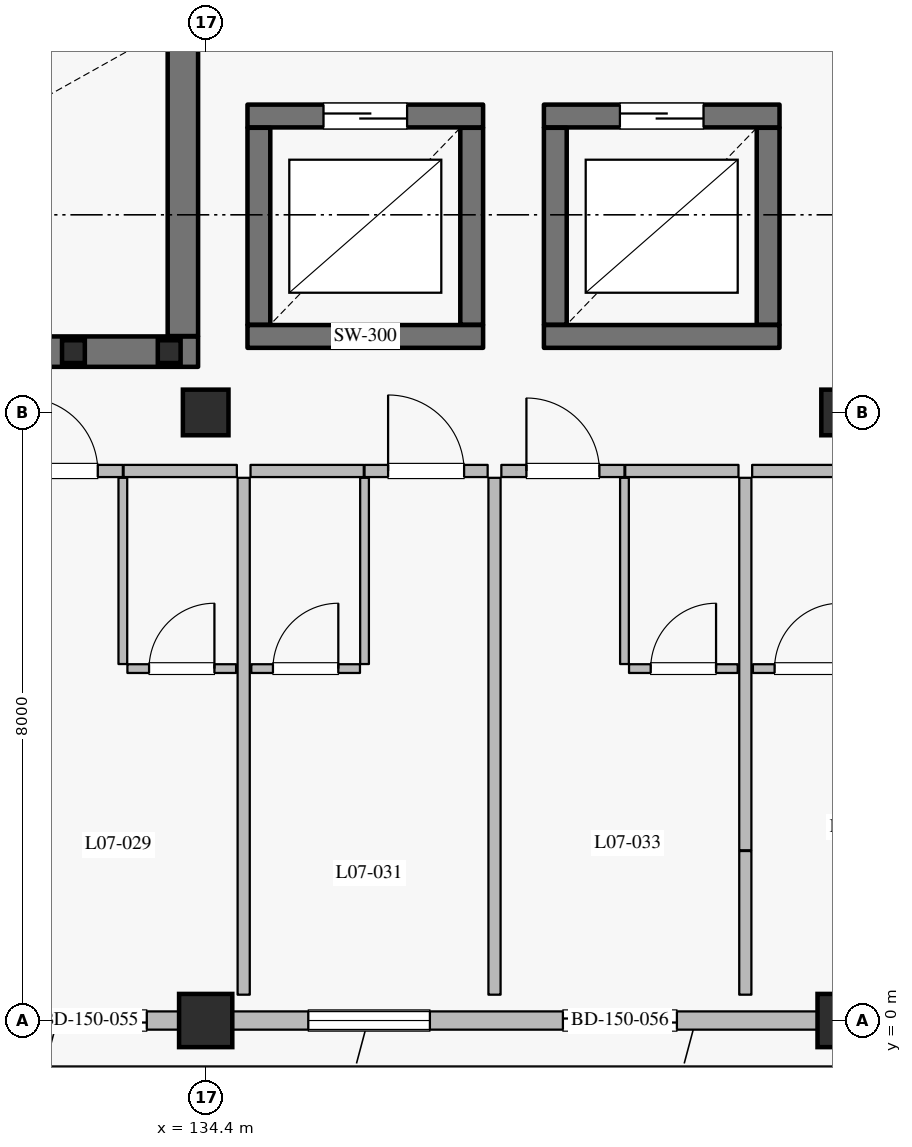
"""IFC4 building model, lengths in metres.
Left out: names, types, materials, properties, quantities, classifications, styles, units other than length and angle.
Written with IfcOpenShell. Run it as: python <this file> out.ifc"""

import sys

from ifc_helpers import new_model, si_unit, direction, frame, frame_2d, origin, origin_2d, place, context, subcontext, project, spatial, rectangle, hollow_rectangle, extrude, element, fill, save


model = new_model("IFC4")
c1 = context("Model", 3, precision=1e-05, world=origin(), true_north=direction((0.0, 1.0)))
c2 = subcontext(c1, "Body", "Model", "MODEL_VIEW")
j1 = project(units=[si_unit("LENGTHUNIT", "METRE"), si_unit("PLANEANGLEUNIT", "RADIAN")], contexts=[c1])
p1 = place(None, origin())
s1 = spatial("IfcSite", under=j1, at=p1, CompositionType="ELEMENT")
p2 = place(p1, origin())
s2 = spatial("IfcBuilding", under=s1, at=p2, CompositionType="ELEMENT")
p3 = place(p2, frame((0.0, 0.0, 32.4)))
s3 = spatial("IfcBuildingStorey", under=s2, at=p3, CompositionType="ELEMENT", Elevation=32.4)
for number, where, z_axis, x_axis in (
    (1, (134.4, 0.0, 0.0), (0.0, 0.0, 1.0), (1.0, 0.0, 0.0)),
    (2, (142.8, 0.0, 0.0), (0.0, 0.0, 1.0), (1.0, 0.0, 0.0)),
):
    element("IfcColumn", number, at=place(p3, frame(where, z_axis=z_axis, x_axis=x_axis)), inside=s3, PredefinedType="COLUMN", context=c2, shape_type="SweptSolid", body=[
        extrude(rectangle(XDim=0.7, YDim=0.7, at=origin_2d()), origin(), (0.0, 0.0, 1.0), 3.6),
    ])
for number, where, z_axis, x_axis in (
    (3, (134.4, 8.0, 0.0), (0.0, 0.0, 1.0), (1.0, 0.0, 0.0)),
    (4, (142.8, 8.0, 0.0), (0.0, 0.0, 1.0), (1.0, 0.0, 0.0)),
):
    element("IfcColumn", number, at=place(p3, frame(where, z_axis=z_axis, x_axis=x_axis)), inside=s3, PredefinedType="COLUMN", context=c2, shape_type="SweptSolid", body=[
        extrude(rectangle(XDim=0.6, YDim=0.6, at=origin_2d()), origin(), (0.0, 0.0, 1.0), 3.6),
    ])
p4 = place(p3, frame((134.05, 0.0, 0.0), z_axis=(0.0, 0.0, 1.0), x_axis=(-1.0, 0.0, 0.0)))
e5 = element("IfcWall", 5, at=p4, inside=s3, PredefinedType="SOLIDWALL", context=c2, shape_type="SweptSolid", body=[
    extrude(rectangle(XDim=7.7, YDim=0.24, at=frame_2d((3.85, 0.0))), origin(), (0.0, 0.0, 1.0), 2.94),
])
p5 = place(p4, frame((0.425, 0.0, 0.0)))
e6 = element("IfcOpeningElement", 6, at=p5, cuts=e5, PredefinedType="OPENING", context=c2, shape_type="SweptSolid", body=[
    extrude(rectangle(XDim=1.5, YDim=2.25, at=frame_2d((0.75, 1.125))), frame((0.0, 0.13, 0.0), z_axis=(0.0, -1.0, 0.0), x_axis=(1.0, 0.0, 0.0)), (0.0, 0.0, 1.0), 0.26),
])
p6 = place(p4, frame((3.3, 0.0, 0.8)))
e7 = element("IfcOpeningElement", 7, at=p6, cuts=e5, PredefinedType="OPENING", context=c2, shape_type="SweptSolid", body=[
    extrude(rectangle(XDim=1.6, YDim=1.6, at=frame_2d((0.8, 0.8))), frame((0.0, 0.13, 0.0), z_axis=(0.0, -1.0, 0.0), x_axis=(1.0, 0.0, 0.0)), (0.0, 0.0, 1.0), 0.26),
])
p7 = place(p4, frame((5.975, 0.0, 0.8)))
e8 = element("IfcOpeningElement", 8, at=p7, cuts=e5, PredefinedType="OPENING", context=c2, shape_type="SweptSolid", body=[
    extrude(rectangle(XDim=1.6, YDim=1.6, at=frame_2d((0.8, 0.8))), frame((0.0, 0.13, 0.0), z_axis=(0.0, -1.0, 0.0), x_axis=(1.0, 0.0, 0.0)), (0.0, 0.0, 1.0), 0.26),
])
p8 = place(p3, frame((142.45, 0.0, 0.0), z_axis=(0.0, 0.0, 1.0), x_axis=(-1.0, 0.0, 0.0)))
e9 = element("IfcWall", 9, at=p8, inside=s3, PredefinedType="SOLIDWALL", context=c2, shape_type="SweptSolid", body=[
    extrude(rectangle(XDim=7.7, YDim=0.24, at=frame_2d((3.85, 0.0))), origin(), (0.0, 0.0, 1.0), 2.94),
])
p9 = place(p8, frame((1.85, 0.0, 0.0)))
e10 = element("IfcOpeningElement", 10, at=p9, cuts=e9, PredefinedType="OPENING", context=c2, shape_type="SweptSolid", body=[
    extrude(rectangle(XDim=1.5, YDim=2.25, at=frame_2d((0.75, 1.125))), frame((0.0, 0.13, 0.0), z_axis=(0.0, -1.0, 0.0), x_axis=(1.0, 0.0, 0.0)), (0.0, 0.0, 1.0), 0.26),
])
p10 = place(p8, frame((5.1, 0.0, 0.8)))
e11 = element("IfcOpeningElement", 11, at=p10, cuts=e9, PredefinedType="OPENING", context=c2, shape_type="SweptSolid", body=[
    extrude(rectangle(XDim=1.6, YDim=1.6, at=frame_2d((0.8, 0.8))), frame((0.0, 0.13, 0.0), z_axis=(0.0, -1.0, 0.0), x_axis=(1.0, 0.0, 0.0)), (0.0, 0.0, 1.0), 0.26),
])
p11 = place(p3, frame((134.95, 9.0, 0.0), z_axis=(0.0, 0.0, 1.0), x_axis=(1.0, 0.0, 0.0)))
e12 = element("IfcWall", 12, at=p11, inside=s3, PredefinedType="SHEAR", context=c2, shape_type="SweptSolid", body=[
    extrude(rectangle(XDim=3.1, YDim=0.3, at=frame_2d((1.55, 0.0))), origin(), (0.0, 0.0, 1.0), 3.335),
])
p12 = place(p3, frame((137.9, 9.155, 0.0), z_axis=(0.0, 0.0, 1.0), x_axis=(0.0, 1.0, 0.0)))
e13 = element("IfcWall", 13, at=p12, inside=s3, PredefinedType="SHEAR", context=c2, shape_type="SweptSolid", body=[
    extrude(rectangle(XDim=2.59, YDim=0.3, at=frame_2d((1.295, 0.0))), origin(), (0.0, 0.0, 1.0), 3.335),
])
p13 = place(p3, frame((138.05, 11.9, 0.0), z_axis=(0.0, 0.0, 1.0), x_axis=(-1.0, 0.0, 0.0)))
e14 = element("IfcWall", 14, at=p13, inside=s3, PredefinedType="SHEAR", context=c2, shape_type="SweptSolid", body=[
    extrude(rectangle(XDim=3.1, YDim=0.3, at=frame_2d((1.55, 0.0))), origin(), (0.0, 0.0, 1.0), 3.335),
])
p14 = place(p13, frame((1.0, 0.0, 0.0)))
e15 = element("IfcOpeningElement", 15, at=p14, cuts=e14, PredefinedType="OPENING", context=c2, shape_type="SweptSolid", body=[
    extrude(rectangle(XDim=1.1, YDim=2.2, at=frame_2d((0.55, 1.1))), frame((0.0, 0.16, 0.0), z_axis=(0.0, -1.0, 0.0), x_axis=(1.0, 0.0, 0.0)), (0.0, 0.0, 1.0), 0.32),
])
p15 = place(p3, frame((135.1, 11.745, 0.0), z_axis=(0.0, 0.0, 1.0), x_axis=(0.0, -1.0, 0.0)))
e16 = element("IfcWall", 16, at=p15, inside=s3, PredefinedType="SHEAR", context=c2, shape_type="SweptSolid", body=[
    extrude(rectangle(XDim=2.59, YDim=0.3, at=frame_2d((1.295, 0.0))), origin(), (0.0, 0.0, 1.0), 3.335),
])
p16 = place(p3, frame((138.85, 9.0, 0.0), z_axis=(0.0, 0.0, 1.0), x_axis=(1.0, 0.0, 0.0)))
e17 = element("IfcWall", 17, at=p16, inside=s3, PredefinedType="SHEAR", context=c2, shape_type="SweptSolid", body=[
    extrude(rectangle(XDim=3.1, YDim=0.3, at=frame_2d((1.55, 0.0))), origin(), (0.0, 0.0, 1.0), 3.335),
])
p17 = place(p3, frame((141.8, 9.155, 0.0), z_axis=(0.0, 0.0, 1.0), x_axis=(0.0, 1.0, 0.0)))
e18 = element("IfcWall", 18, at=p17, inside=s3, PredefinedType="SHEAR", context=c2, shape_type="SweptSolid", body=[
    extrude(rectangle(XDim=2.59, YDim=0.3, at=frame_2d((1.295, 0.0))), origin(), (0.0, 0.0, 1.0), 3.335),
])
p18 = place(p3, frame((141.95, 11.9, 0.0), z_axis=(0.0, 0.0, 1.0), x_axis=(-1.0, 0.0, 0.0)))
e19 = element("IfcWall", 19, at=p18, inside=s3, PredefinedType="SHEAR", context=c2, shape_type="SweptSolid", body=[
    extrude(rectangle(XDim=3.1, YDim=0.3, at=frame_2d((1.55, 0.0))), origin(), (0.0, 0.0, 1.0), 3.335),
])
p19 = place(p18, frame((1.0, 0.0, 0.0)))
e20 = element("IfcOpeningElement", 20, at=p19, cuts=e19, PredefinedType="OPENING", context=c2, shape_type="SweptSolid", body=[
    extrude(rectangle(XDim=1.1, YDim=2.2, at=frame_2d((0.55, 1.1))), frame((0.0, 0.16, 0.0), z_axis=(0.0, -1.0, 0.0), x_axis=(1.0, 0.0, 0.0)), (0.0, 0.0, 1.0), 0.32),
])
p20 = place(p3, frame((139.0, 11.745, 0.0), z_axis=(0.0, 0.0, 1.0), x_axis=(0.0, -1.0, 0.0)))
e21 = element("IfcWall", 21, at=p20, inside=s3, PredefinedType="SHEAR", context=c2, shape_type="SweptSolid", body=[
    extrude(rectangle(XDim=2.59, YDim=0.3, at=frame_2d((1.295, 0.0))), origin(), (0.0, 0.0, 1.0), 3.335),
])
p21 = place(p3, frame((126.1, 8.8, 0.0), z_axis=(0.0, 0.0, 1.0), x_axis=(1.0, 0.0, 0.0)))
e22 = element("IfcWall", 22, at=p21, inside=s3, PredefinedType="SHEAR", context=c2, shape_type="SweptSolid", body=[
    extrude(rectangle(XDim=8.2, YDim=0.4, at=frame_2d((4.1, 0.0))), origin(), (0.0, 0.0, 1.0), 3.335),
])
p22 = place(p3, frame((134.1, 9.005, 0.0), z_axis=(0.0, 0.0, 1.0), x_axis=(0.0, 1.0, 0.0)))
e23 = element("IfcWall", 23, at=p22, inside=s3, PredefinedType="SHEAR", context=c2, shape_type="SweptSolid", body=[
    extrude(rectangle(XDim=3.95, YDim=0.4, at=frame_2d((1.975, 0.0))), origin(), (0.0, 0.0, 1.0), 3.335),
])
for number, where, z_axis, x_axis in (
    (24, (132.66, 8.8, -1.8), (0.0, 0.0, 1.0), (1.0, 0.0, 0.0)),
    (25, (133.92, 8.8, -1.8), (0.0, 0.0, 1.0), (1.0, 0.0, 0.0)),
):
    element("IfcColumn", number, at=place(p3, frame(where, z_axis=z_axis, x_axis=x_axis)), inside=s3, PredefinedType="COLUMN", context=c2, shape_type="SweptSolid", body=[
        extrude(hollow_rectangle(XDim=0.3, YDim=0.3, WallThickness=0.012, at=origin_2d()), origin(), (0.0, 0.0, 1.0), 3.42),
    ])
p23 = place(p3, frame((131.69, 7.23, 0.0), z_axis=(0.0, 0.0, 1.0), x_axis=(1.0, 0.0, 0.0)))
e26 = element("IfcWall", 26, at=p23, inside=s3, PredefinedType="PARTITIONING", context=c2, shape_type="SweptSolid", body=[
    extrude(rectangle(XDim=1.62, YDim=0.16, at=frame_2d((0.81, 0.0))), origin(), (0.0, 0.0, 1.0), 3.335),
])
p24 = place(p23, frame((0.33, 0.0, 0.0)))
e27 = element("IfcOpeningElement", 27, at=p24, cuts=e26, PredefinedType="OPENING", context=c2, shape_type="SweptSolid", body=[
    extrude(rectangle(XDim=0.96, YDim=2.2, at=frame_2d((0.48, 1.1))), frame((0.0, 0.09, 0.0), z_axis=(0.0, -1.0, 0.0), x_axis=(1.0, 0.0, 0.0)), (0.0, 0.0, 1.0), 0.18),
])
p25 = place(p3, frame((133.32, 7.23, 0.0), z_axis=(0.0, 0.0, 1.0), x_axis=(1.0, 0.0, 0.0)))
e28 = element("IfcWall", 28, at=p25, inside=s3, PredefinedType="PARTITIONING", context=c2, shape_type="SweptSolid", body=[
    extrude(rectangle(XDim=1.49, YDim=0.16, at=frame_2d((0.745, 0.0))), origin(), (0.0, 0.0, 1.0), 3.335),
])
p26 = place(p3, frame((133.31, 4.69, 0.0), z_axis=(0.0, 0.0, 1.0), x_axis=(0.0, 1.0, 0.0)))
e29 = element("IfcWall", 29, at=p26, inside=s3, PredefinedType="PARTITIONING", context=c2, shape_type="SweptSolid", body=[
    extrude(rectangle(XDim=2.45, YDim=0.115, at=frame_2d((1.225, 0.0))), origin(), (0.0, 0.0, 1.0), 3.335),
])
p27 = place(p3, frame((133.37, 4.63, 0.0), z_axis=(0.0, 0.0, 1.0), x_axis=(1.0, 0.0, 0.0)))
e30 = element("IfcWall", 30, at=p27, inside=s3, PredefinedType="PARTITIONING", context=c2, shape_type="SweptSolid", body=[
    extrude(rectangle(XDim=1.43, YDim=0.115, at=frame_2d((0.715, 0.0))), origin(), (0.0, 0.0, 1.0), 3.335),
])
p28 = place(p27, frame((0.285, 0.0, 0.0)))
e31 = element("IfcOpeningElement", 31, at=p28, cuts=e30, PredefinedType="OPENING", context=c2, shape_type="SweptSolid", body=[
    extrude(rectangle(XDim=0.86, YDim=2.12, at=frame_2d((0.43, 1.06))), frame((0.0, 0.067, 0.0), z_axis=(0.0, -1.0, 0.0), x_axis=(1.0, 0.0, 0.0)), (0.0, 0.0, 1.0), 0.135),
])
p29 = place(p3, frame((134.99, 7.23, 0.0), z_axis=(0.0, 0.0, 1.0), x_axis=(1.0, 0.0, 0.0)))
e32 = element("IfcWall", 32, at=p29, inside=s3, PredefinedType="PARTITIONING", context=c2, shape_type="SweptSolid", body=[
    extrude(rectangle(XDim=1.49, YDim=0.16, at=frame_2d((0.745, 0.0))), origin(), (0.0, 0.0, 1.0), 3.335),
])
p30 = place(p3, frame((136.49, 7.23, 0.0), z_axis=(0.0, 0.0, 1.0), x_axis=(1.0, 0.0, 0.0)))
e33 = element("IfcWall", 33, at=p30, inside=s3, PredefinedType="PARTITIONING", context=c2, shape_type="SweptSolid", body=[
    extrude(rectangle(XDim=1.62, YDim=0.16, at=frame_2d((0.81, 0.0))), origin(), (0.0, 0.0, 1.0), 3.335),
])
p31 = place(p30, frame((0.31, 0.0, 0.0)))
e34 = element("IfcOpeningElement", 34, at=p31, cuts=e33, PredefinedType="OPENING", context=c2, shape_type="SweptSolid", body=[
    extrude(rectangle(XDim=1.0, YDim=2.25, at=frame_2d((0.5, 1.125))), frame((0.0, 0.09, 0.0), z_axis=(0.0, -1.0, 0.0), x_axis=(1.0, 0.0, 0.0)), (0.0, 0.0, 1.0), 0.18),
])
p32 = place(p3, frame((136.49, 4.69, 0.0), z_axis=(0.0, 0.0, 1.0), x_axis=(0.0, 1.0, 0.0)))
e35 = element("IfcWall", 35, at=p32, inside=s3, PredefinedType="PARTITIONING", context=c2, shape_type="SweptSolid", body=[
    extrude(rectangle(XDim=2.45, YDim=0.115, at=frame_2d((1.225, 0.0))), origin(), (0.0, 0.0, 1.0), 3.335),
])
p33 = place(p3, frame((135.0, 4.63, 0.0), z_axis=(0.0, 0.0, 1.0), x_axis=(1.0, 0.0, 0.0)))
e36 = element("IfcWall", 36, at=p33, inside=s3, PredefinedType="PARTITIONING", context=c2, shape_type="SweptSolid", body=[
    extrude(rectangle(XDim=1.43, YDim=0.115, at=frame_2d((0.715, 0.0))), origin(), (0.0, 0.0, 1.0), 3.335),
])
p34 = place(p33, frame((0.285, 0.0, 0.0)))
e37 = element("IfcOpeningElement", 37, at=p34, cuts=e36, PredefinedType="OPENING", context=c2, shape_type="SweptSolid", body=[
    extrude(rectangle(XDim=0.86, YDim=2.12, at=frame_2d((0.43, 1.06))), frame((0.0, 0.067, 0.0), z_axis=(0.0, -1.0, 0.0), x_axis=(1.0, 0.0, 0.0)), (0.0, 0.0, 1.0), 0.135),
])
p35 = place(p3, frame((134.9, 0.34, 0.0), z_axis=(0.0, 0.0, 1.0), x_axis=(0.0, 1.0, 0.0)))
e38 = element("IfcWall", 38, at=p35, inside=s3, PredefinedType="PARTITIONING", context=c2, shape_type="SweptSolid", body=[
    extrude(rectangle(XDim=6.8, YDim=0.16, at=frame_2d((3.4, 0.0))), origin(), (0.0, 0.0, 1.0), 3.335),
])
p36 = place(p3, frame((138.29, 7.23, 0.0), z_axis=(0.0, 0.0, 1.0), x_axis=(1.0, 0.0, 0.0)))
e39 = element("IfcWall", 39, at=p36, inside=s3, PredefinedType="PARTITIONING", context=c2, shape_type="SweptSolid", body=[
    extrude(rectangle(XDim=1.62, YDim=0.16, at=frame_2d((0.81, 0.0))), origin(), (0.0, 0.0, 1.0), 3.335),
])
p37 = place(p36, frame((0.33, 0.0, 0.0)))
e40 = element("IfcOpeningElement", 40, at=p37, cuts=e39, PredefinedType="OPENING", context=c2, shape_type="SweptSolid", body=[
    extrude(rectangle(XDim=0.96, YDim=2.2, at=frame_2d((0.48, 1.1))), frame((0.0, 0.09, 0.0), z_axis=(0.0, -1.0, 0.0), x_axis=(1.0, 0.0, 0.0)), (0.0, 0.0, 1.0), 0.18),
])
p38 = place(p3, frame((139.92, 7.23, 0.0), z_axis=(0.0, 0.0, 1.0), x_axis=(1.0, 0.0, 0.0)))
e41 = element("IfcWall", 41, at=p38, inside=s3, PredefinedType="PARTITIONING", context=c2, shape_type="SweptSolid", body=[
    extrude(rectangle(XDim=1.49, YDim=0.16, at=frame_2d((0.745, 0.0))), origin(), (0.0, 0.0, 1.0), 3.335),
])
p39 = place(p3, frame((139.91, 4.69, 0.0), z_axis=(0.0, 0.0, 1.0), x_axis=(0.0, 1.0, 0.0)))
e42 = element("IfcWall", 42, at=p39, inside=s3, PredefinedType="PARTITIONING", context=c2, shape_type="SweptSolid", body=[
    extrude(rectangle(XDim=2.45, YDim=0.115, at=frame_2d((1.225, 0.0))), origin(), (0.0, 0.0, 1.0), 3.335),
])
p40 = place(p3, frame((139.97, 4.63, 0.0), z_axis=(0.0, 0.0, 1.0), x_axis=(1.0, 0.0, 0.0)))
e43 = element("IfcWall", 43, at=p40, inside=s3, PredefinedType="PARTITIONING", context=c2, shape_type="SweptSolid", body=[
    extrude(rectangle(XDim=1.43, YDim=0.115, at=frame_2d((0.715, 0.0))), origin(), (0.0, 0.0, 1.0), 3.335),
])
p41 = place(p40, frame((0.285, 0.0, 0.0)))
e44 = element("IfcOpeningElement", 44, at=p41, cuts=e43, PredefinedType="OPENING", context=c2, shape_type="SweptSolid", body=[
    extrude(rectangle(XDim=0.86, YDim=2.12, at=frame_2d((0.43, 1.06))), frame((0.0, 0.067, 0.0), z_axis=(0.0, -1.0, 0.0), x_axis=(1.0, 0.0, 0.0)), (0.0, 0.0, 1.0), 0.135),
])
p42 = place(p3, frame((138.2, 0.34, 0.0), z_axis=(0.0, 0.0, 1.0), x_axis=(0.0, 1.0, 0.0)))
e45 = element("IfcWall", 45, at=p42, inside=s3, PredefinedType="PARTITIONING", context=c2, shape_type="SweptSolid", body=[
    extrude(rectangle(XDim=6.8, YDim=0.16, at=frame_2d((3.4, 0.0))), origin(), (0.0, 0.0, 1.0), 3.335),
])
p43 = place(p3, frame((141.5, 0.34, 0.0), z_axis=(0.0, 0.0, 1.0), x_axis=(0.0, 1.0, 0.0)))
e46 = element("IfcWall", 46, at=p43, inside=s3, PredefinedType="PARTITIONING", context=c2, shape_type="SweptSolid", body=[
    extrude(rectangle(XDim=1.89, YDim=0.16, at=frame_2d((0.945, 0.0))), origin(), (0.0, 0.0, 1.0), 3.335),
])
p44 = place(p3, frame((141.59, 7.23, 0.0), z_axis=(0.0, 0.0, 1.0), x_axis=(1.0, 0.0, 0.0)))
e47 = element("IfcWall", 47, at=p44, inside=s3, PredefinedType="PARTITIONING", context=c2, shape_type="SweptSolid", body=[
    extrude(rectangle(XDim=1.49, YDim=0.16, at=frame_2d((0.745, 0.0))), origin(), (0.0, 0.0, 1.0), 3.335),
])
p45 = place(p3, frame((141.6, 4.63, 0.0), z_axis=(0.0, 0.0, 1.0), x_axis=(1.0, 0.0, 0.0)))
e48 = element("IfcWall", 48, at=p45, inside=s3, PredefinedType="PARTITIONING", context=c2, shape_type="SweptSolid", body=[
    extrude(rectangle(XDim=1.43, YDim=0.115, at=frame_2d((0.715, 0.0))), origin(), (0.0, 0.0, 1.0), 3.335),
])
p46 = place(p45, frame((0.285, 0.0, 0.0)))
e49 = element("IfcOpeningElement", 49, at=p46, cuts=e48, PredefinedType="OPENING", context=c2, shape_type="SweptSolid", body=[
    extrude(rectangle(XDim=0.86, YDim=2.12, at=frame_2d((0.43, 1.06))), frame((0.0, 0.067, 0.0), z_axis=(0.0, -1.0, 0.0), x_axis=(1.0, 0.0, 0.0)), (0.0, 0.0, 1.0), 0.135),
])
p47 = place(p3, frame((141.5, 2.24, 0.0), z_axis=(0.0, 0.0, 1.0), x_axis=(0.0, 1.0, 0.0)))
e50 = element("IfcWall", 50, at=p47, inside=s3, PredefinedType="PARTITIONING", context=c2, shape_type="SweptSolid", body=[
    extrude(rectangle(XDim=4.9, YDim=0.16, at=frame_2d((2.45, 0.0))), origin(), (0.0, 0.0, 1.0), 3.335),
])
p48 = place(p5, origin())
e51 = element("IfcDoor", 51, at=p48, inside=s3, OperationType="SLIDING_TO_LEFT", PredefinedType="DOOR", context=c2, shape_type="SweptSolid", body=[
    extrude(rectangle(XDim=1.5, YDim=2.25, at=frame_2d((0.75, 1.125))), frame((0.0, 0.025, 0.0), z_axis=(0.0, -1.0, 0.0), x_axis=(1.0, 0.0, 0.0)), (0.0, 0.0, 1.0), 0.05),
])
fill(e6, e51)
p49 = place(p9, origin())
e52 = element("IfcDoor", 52, at=p49, inside=s3, OperationType="SLIDING_TO_LEFT", PredefinedType="DOOR", context=c2, shape_type="SweptSolid", body=[
    extrude(rectangle(XDim=1.5, YDim=2.25, at=frame_2d((0.75, 1.125))), frame((0.0, 0.025, 0.0), z_axis=(0.0, -1.0, 0.0), x_axis=(1.0, 0.0, 0.0)), (0.0, 0.0, 1.0), 0.05),
])
fill(e10, e52)
p50 = place(p10, origin())
e53 = element("IfcWindow", 53, at=p50, inside=s3, PartitioningType="SINGLE_PANEL", PredefinedType="WINDOW", context=c2, shape_type="SweptSolid", body=[
    extrude(rectangle(XDim=1.6, YDim=1.6, at=frame_2d((0.8, 0.8))), frame((0.0, 0.03, 0.0), z_axis=(0.0, -1.0, 0.0), x_axis=(1.0, 0.0, 0.0)), (0.0, 0.0, 1.0), 0.06),
])
fill(e11, e53)
p51 = place(p14, origin())
e54 = element("IfcDoor", 54, at=p51, inside=s3, OperationType="DOUBLE_DOOR_SLIDING", PredefinedType="DOOR", context=c2, shape_type="SweptSolid", body=[
    extrude(rectangle(XDim=1.1, YDim=2.2, at=frame_2d((0.55, 1.1))), frame((0.0, 0.025, 0.0), z_axis=(0.0, -1.0, 0.0), x_axis=(1.0, 0.0, 0.0)), (0.0, 0.0, 1.0), 0.05),
])
fill(e15, e54)
p52 = place(p19, origin())
e55 = element("IfcDoor", 55, at=p52, inside=s3, OperationType="DOUBLE_DOOR_SLIDING", PredefinedType="DOOR", context=c2, shape_type="SweptSolid", body=[
    extrude(rectangle(XDim=1.1, YDim=2.2, at=frame_2d((0.55, 1.1))), frame((0.0, 0.025, 0.0), z_axis=(0.0, -1.0, 0.0), x_axis=(1.0, 0.0, 0.0)), (0.0, 0.0, 1.0), 0.05),
])
fill(e20, e55)
p53 = place(p24, origin())
e56 = element("IfcDoor", 56, at=p53, inside=s3, OperationType="SINGLE_SWING_LEFT", PredefinedType="DOOR", context=c2, shape_type="SweptSolid", body=[
    extrude(rectangle(XDim=0.96, YDim=2.2, at=frame_2d((0.48, 1.1))), frame((0.0, 0.025, 0.0), z_axis=(0.0, -1.0, 0.0), x_axis=(1.0, 0.0, 0.0)), (0.0, 0.0, 1.0), 0.05),
])
fill(e27, e56)
p54 = place(p28, origin())
e57 = element("IfcDoor", 57, at=p54, inside=s3, OperationType="SINGLE_SWING_RIGHT", PredefinedType="DOOR", context=c2, shape_type="SweptSolid", body=[
    extrude(rectangle(XDim=0.86, YDim=2.12, at=frame_2d((0.43, 1.06))), frame((0.0, 0.025, 0.0), z_axis=(0.0, -1.0, 0.0), x_axis=(1.0, 0.0, 0.0)), (0.0, 0.0, 1.0), 0.05),
])
fill(e31, e57)
p55 = place(p31, origin())
e58 = element("IfcDoor", 58, at=p55, inside=s3, OperationType="SINGLE_SWING_LEFT", PredefinedType="DOOR", context=c2, shape_type="SweptSolid", body=[
    extrude(rectangle(XDim=1.0, YDim=2.25, at=frame_2d((0.5, 1.125))), frame((0.0, 0.025, 0.0), z_axis=(0.0, -1.0, 0.0), x_axis=(1.0, 0.0, 0.0)), (0.0, 0.0, 1.0), 0.05),
])
fill(e34, e58)
p56 = place(p34, origin())
e59 = element("IfcDoor", 59, at=p56, inside=s3, OperationType="SINGLE_SWING_RIGHT", PredefinedType="DOOR", context=c2, shape_type="SweptSolid", body=[
    extrude(rectangle(XDim=0.86, YDim=2.12, at=frame_2d((0.43, 1.06))), frame((0.0, 0.025, 0.0), z_axis=(0.0, -1.0, 0.0), x_axis=(1.0, 0.0, 0.0)), (0.0, 0.0, 1.0), 0.05),
])
fill(e37, e59)
p57 = place(p37, origin())
e60 = element("IfcDoor", 60, at=p57, inside=s3, OperationType="SINGLE_SWING_LEFT", PredefinedType="DOOR", context=c2, shape_type="SweptSolid", body=[
    extrude(rectangle(XDim=0.96, YDim=2.2, at=frame_2d((0.48, 1.1))), frame((0.0, 0.025, 0.0), z_axis=(0.0, -1.0, 0.0), x_axis=(1.0, 0.0, 0.0)), (0.0, 0.0, 1.0), 0.05),
])
fill(e40, e60)
p58 = place(p41, origin())
e61 = element("IfcDoor", 61, at=p58, inside=s3, OperationType="SINGLE_SWING_RIGHT", PredefinedType="DOOR", context=c2, shape_type="SweptSolid", body=[
    extrude(rectangle(XDim=0.86, YDim=2.12, at=frame_2d((0.43, 1.06))), frame((0.0, 0.025, 0.0), z_axis=(0.0, -1.0, 0.0), x_axis=(1.0, 0.0, 0.0)), (0.0, 0.0, 1.0), 0.05),
])
fill(e44, e61)
p59 = place(p46, origin())
e62 = element("IfcDoor", 62, at=p59, inside=s3, OperationType="SINGLE_SWING_RIGHT", PredefinedType="DOOR", context=c2, shape_type="SweptSolid", body=[
    extrude(rectangle(XDim=0.86, YDim=2.12, at=frame_2d((0.43, 1.06))), frame((0.0, 0.025, 0.0), z_axis=(0.0, -1.0, 0.0), x_axis=(1.0, 0.0, 0.0)), (0.0, 0.0, 1.0), 0.05),
])
fill(e49, e62)
save(model, sys.argv[1])
